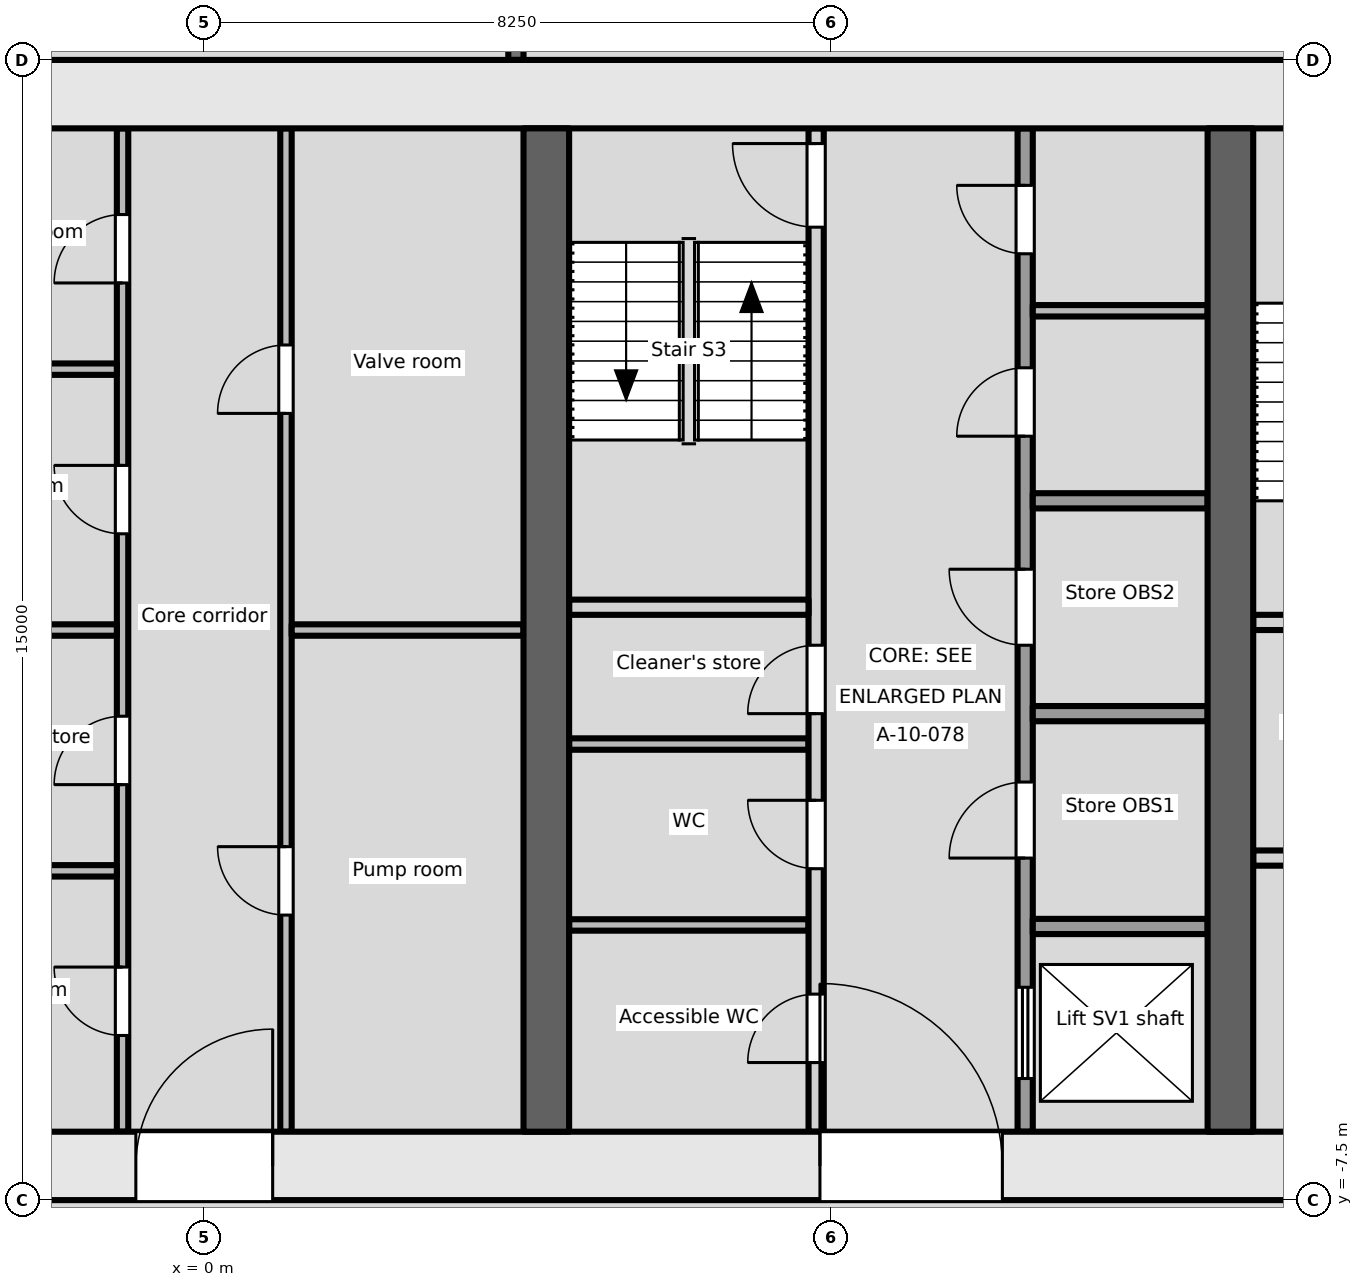
"""IFC4 building model, lengths in metres.
Left out: names, types, materials, properties, quantities, classifications, styles, units other than length and angle.
Written with IfcOpenShell. Run it as: python <this file> out.ifc"""

import sys

from ifc_helpers import new_model, si_unit, direction, frame, frame_2d, origin, place, context, subcontext, project, spatial, rectangle, extrude, element, fill, save


model = new_model("IFC4")
c1 = context("Model", 3, precision=1e-05, world=origin(), true_north=direction((0.0, 1.0)))
c2 = subcontext(c1, "Body", "Model", "MODEL_VIEW")
j1 = project(units=[si_unit("LENGTHUNIT", "METRE"), si_unit("PLANEANGLEUNIT", "RADIAN")], contexts=[c1])
p1 = place(None, origin())
s1 = spatial("IfcSite", under=j1, at=p1, CompositionType="ELEMENT")
p2 = place(p1, origin())
s2 = spatial("IfcBuilding", under=s1, at=p2, CompositionType="ELEMENT")
p3 = place(p2, frame((0.0, 0.0, -13.5)))
s3 = spatial("IfcBuildingStorey", under=s2, at=p3, CompositionType="ELEMENT", Elevation=-13.5)
p4 = place(p3, frame((-18.0, -7.05, -0.2), z_axis=(0.0, 0.0, 1.0), x_axis=(1.0, 0.0, 0.0)))
e1 = element("IfcWall", 1, at=p4, inside=s3, PredefinedType="SHEAR", context=c2, shape_type="SweptSolid", body=[
    extrude(rectangle(XDim=36.0, YDim=0.9, at=frame_2d((18.0, 0.0))), origin(), (0.0, 0.0, 1.0), 4.0),
])
p5 = place(p4, frame((8.1, 0.0, 0.2)))
e2 = element("IfcOpeningElement", 2, at=p5, cuts=e1, PredefinedType="OPENING", context=c2, shape_type="SweptSolid", body=[
    extrude(rectangle(XDim=1.8, YDim=2.1, at=frame_2d((0.9, 1.05))), frame((0.0, 0.46, 0.0), z_axis=(0.0, -1.0, 0.0), x_axis=(1.0, 0.0, 0.0)), (0.0, 0.0, 1.0), 0.921),
])
p6 = place(p4, frame((17.1, 0.0, 0.2)))
e3 = element("IfcOpeningElement", 3, at=p6, cuts=e1, PredefinedType="OPENING", context=c2, shape_type="SweptSolid", body=[
    extrude(rectangle(XDim=1.8, YDim=2.1, at=frame_2d((0.9, 1.05))), frame((0.0, 0.46, 0.0), z_axis=(0.0, -1.0, 0.0), x_axis=(1.0, 0.0, 0.0)), (0.0, 0.0, 1.0), 0.921),
])
p7 = place(p4, frame((26.1, 0.0, 0.2)))
e4 = element("IfcOpeningElement", 4, at=p7, cuts=e1, PredefinedType="OPENING", context=c2, shape_type="SweptSolid", body=[
    extrude(rectangle(XDim=2.4, YDim=2.1, at=frame_2d((1.2, 1.05))), frame((0.0, 0.46, 0.0), z_axis=(0.0, -1.0, 0.0), x_axis=(1.0, 0.0, 0.0)), (0.0, 0.0, 1.0), 0.921),
])
p8 = place(p3, frame((-18.0, 7.05, -0.2), z_axis=(0.0, 0.0, 1.0), x_axis=(1.0, 0.0, 0.0)))
e5 = element("IfcWall", 5, at=p8, inside=s3, PredefinedType="SHEAR", context=c2, shape_type="SweptSolid", body=[
    extrude(rectangle(XDim=36.0, YDim=0.9, at=frame_2d((18.0, 0.0))), origin(), (0.0, 0.0, 1.0), 4.0),
])
for number, where, z_axis, x_axis in (
    (6, (4.5, -6.6, -0.2), (0.0, 0.0, 1.0), (0.0, 1.0, 0.0)),
    (7, (13.5, -6.6, -0.2), (0.0, 0.0, 1.0), (0.0, 1.0, 0.0)),
):
    element("IfcWall", number, at=place(p3, frame(where, z_axis=z_axis, x_axis=x_axis)), inside=s3, PredefinedType="SHEAR", context=c2, shape_type="SweptSolid", body=[
        extrude(rectangle(XDim=13.2, YDim=0.6, at=frame_2d((6.6, 0.0))), origin(), (0.0, 0.0, 1.0), 4.0),
    ])
p9 = place(p3, frame((13.8, -3.0, 0.0), z_axis=(0.0, 0.0, 1.0), x_axis=(1.0, 0.0, 0.0)))
e8 = element("IfcWall", 8, at=p9, inside=s3, PredefinedType="PARTITIONING", context=c2, shape_type="SweptSolid", body=[
    extrude(rectangle(XDim=3.3, YDim=0.2, at=frame_2d((1.65, 0.0))), origin(), (0.0, 0.0, 1.0), 3.8),
])
p10 = place(p9, frame((1.1, 0.0, 0.0)))
e9 = element("IfcOpeningElement", 9, at=p10, cuts=e8, PredefinedType="OPENING", context=c2, shape_type="SweptSolid", body=[
    extrude(rectangle(XDim=1.1, YDim=2.1, at=frame_2d((0.55, 1.05))), frame((0.0, 0.111, 0.0), z_axis=(0.0, -1.0, 0.0), x_axis=(1.0, 0.0, 0.0)), (0.0, 0.0, 1.0), 0.221),
])
p11 = place(p3, frame((13.8, 0.1, 0.0), z_axis=(0.0, 0.0, 1.0), x_axis=(1.0, 0.0, 0.0)))
e10 = element("IfcWall", 10, at=p11, inside=s3, PredefinedType="PARTITIONING", context=c2, shape_type="SweptSolid", body=[
    extrude(rectangle(XDim=3.3, YDim=0.2, at=frame_2d((1.65, 0.0))), origin(), (0.0, 0.0, 1.0), 3.8),
])
p12 = place(p11, frame((1.1, 0.0, 0.0)))
e11 = element("IfcOpeningElement", 11, at=p12, cuts=e10, PredefinedType="OPENING", context=c2, shape_type="SweptSolid", body=[
    extrude(rectangle(XDim=1.1, YDim=2.1, at=frame_2d((0.55, 1.05))), frame((0.0, 0.111, 0.0), z_axis=(0.0, -1.0, 0.0), x_axis=(1.0, 0.0, 0.0)), (0.0, 0.0, 1.0), 0.221),
])
p13 = place(p3, frame((-1.075, -6.6, 0.0), z_axis=(0.0, 0.0, 1.0), x_axis=(0.0, 1.0, 0.0)))
e12 = element("IfcWall", 12, at=p13, inside=s3, PredefinedType="PARTITIONING", context=c2, shape_type="SweptSolid", body=[
    extrude(rectangle(XDim=13.2, YDim=0.15, at=frame_2d((6.6, 0.0))), origin(), (0.0, 0.0, 1.0), 3.8),
])
p14 = place(p13, frame((1.266, 0.0, 0.0)))
e13 = element("IfcOpeningElement", 13, at=p14, cuts=e12, PredefinedType="OPENING", context=c2, shape_type="SweptSolid", body=[
    extrude(rectangle(XDim=0.9, YDim=2.1, at=frame_2d((0.45, 1.05))), frame((0.0, 0.085, 0.0), z_axis=(0.0, -1.0, 0.0), x_axis=(1.0, 0.0, 0.0)), (0.0, 0.0, 1.0), 0.171),
])
p15 = place(p13, frame((4.566, 0.0, 0.0)))
e14 = element("IfcOpeningElement", 14, at=p15, cuts=e12, PredefinedType="OPENING", context=c2, shape_type="SweptSolid", body=[
    extrude(rectangle(XDim=0.9, YDim=2.1, at=frame_2d((0.45, 1.05))), frame((0.0, 0.085, 0.0), z_axis=(0.0, -1.0, 0.0), x_axis=(1.0, 0.0, 0.0)), (0.0, 0.0, 1.0), 0.171),
])
p16 = place(p13, frame((7.866, 0.0, 0.0)))
e15 = element("IfcOpeningElement", 15, at=p16, cuts=e12, PredefinedType="OPENING", context=c2, shape_type="SweptSolid", body=[
    extrude(rectangle(XDim=0.9, YDim=2.1, at=frame_2d((0.45, 1.05))), frame((0.0, 0.085, 0.0), z_axis=(0.0, -1.0, 0.0), x_axis=(1.0, 0.0, 0.0)), (0.0, 0.0, 1.0), 0.171),
])
p17 = place(p13, frame((11.166, 0.0, 0.0)))
e16 = element("IfcOpeningElement", 16, at=p17, cuts=e12, PredefinedType="OPENING", context=c2, shape_type="SweptSolid", body=[
    extrude(rectangle(XDim=0.9, YDim=2.1, at=frame_2d((0.45, 1.05))), frame((0.0, 0.085, 0.0), z_axis=(0.0, -1.0, 0.0), x_axis=(1.0, 0.0, 0.0)), (0.0, 0.0, 1.0), 0.171),
])
for number, where, z_axis, x_axis in (
    (17, (-4.2, -3.168, 0.0), (0.0, 0.0, 1.0), (1.0, 0.0, 0.0)),
    (18, (-4.2, 0.0, 0.0), (0.0, 0.0, 1.0), (1.0, 0.0, 0.0)),
    (19, (-4.2, 3.432, 0.0), (0.0, 0.0, 1.0), (1.0, 0.0, 0.0)),
):
    element("IfcWall", number, at=place(p3, frame(where, z_axis=z_axis, x_axis=x_axis)), inside=s3, PredefinedType="PARTITIONING", context=c2, shape_type="SweptSolid", body=[
        extrude(rectangle(XDim=3.05, YDim=0.15, at=frame_2d((1.525, 0.0))), origin(), (0.0, 0.0, 1.0), 3.8),
    ])
p18 = place(p3, frame((1.075, -6.6, 0.0), z_axis=(0.0, 0.0, 1.0), x_axis=(0.0, 1.0, 0.0)))
e20 = element("IfcWall", 20, at=p18, inside=s3, PredefinedType="PARTITIONING", context=c2, shape_type="SweptSolid", body=[
    extrude(rectangle(XDim=13.2, YDim=0.15, at=frame_2d((6.6, 0.0))), origin(), (0.0, 0.0, 1.0), 3.8),
])
p19 = place(p18, frame((2.85, 0.0, 0.0)))
e21 = element("IfcOpeningElement", 21, at=p19, cuts=e20, PredefinedType="OPENING", context=c2, shape_type="SweptSolid", body=[
    extrude(rectangle(XDim=0.9, YDim=2.1, at=frame_2d((0.45, 1.05))), frame((0.0, 0.085, 0.0), z_axis=(0.0, -1.0, 0.0), x_axis=(1.0, 0.0, 0.0)), (0.0, 0.0, 1.0), 0.171),
])
p20 = place(p18, frame((9.45, 0.0, 0.0)))
e22 = element("IfcOpeningElement", 22, at=p20, cuts=e20, PredefinedType="OPENING", context=c2, shape_type="SweptSolid", body=[
    extrude(rectangle(XDim=0.9, YDim=2.1, at=frame_2d((0.45, 1.05))), frame((0.0, 0.085, 0.0), z_axis=(0.0, -1.0, 0.0), x_axis=(1.0, 0.0, 0.0)), (0.0, 0.0, 1.0), 0.171),
])
p21 = place(p3, frame((1.15, 0.0, 0.0), z_axis=(0.0, 0.0, 1.0), x_axis=(1.0, 0.0, 0.0)))
e23 = element("IfcWall", 23, at=p21, inside=s3, PredefinedType="PARTITIONING", context=c2, shape_type="SweptSolid", body=[
    extrude(rectangle(XDim=3.05, YDim=0.15, at=frame_2d((1.525, 0.0))), origin(), (0.0, 0.0, 1.0), 3.8),
])
p22 = place(p3, frame((8.05, -6.6, 0.0), z_axis=(0.0, 0.0, 1.0), x_axis=(0.0, 1.0, 0.0)))
e24 = element("IfcWall", 24, at=p22, inside=s3, PredefinedType="PARTITIONING", context=c2, shape_type="SweptSolid", body=[
    extrude(rectangle(XDim=13.2, YDim=0.2, at=frame_2d((6.6, 0.0))), origin(), (0.0, 0.0, 1.0), 3.8),
])
p23 = place(p22, frame((0.91, 0.0, 0.0)))
e25 = element("IfcOpeningElement", 25, at=p23, cuts=e24, PredefinedType="OPENING", context=c2, shape_type="SweptSolid", body=[
    extrude(rectangle(XDim=0.9, YDim=2.1, at=frame_2d((0.45, 1.05))), frame((0.0, 0.111, 0.0), z_axis=(0.0, -1.0, 0.0), x_axis=(1.0, 0.0, 0.0)), (0.0, 0.0, 1.0), 0.221),
])
p24 = place(p22, frame((3.46, 0.0, 0.0)))
e26 = element("IfcOpeningElement", 26, at=p24, cuts=e24, PredefinedType="OPENING", context=c2, shape_type="SweptSolid", body=[
    extrude(rectangle(XDim=0.9, YDim=2.1, at=frame_2d((0.45, 1.05))), frame((0.0, 0.111, 0.0), z_axis=(0.0, -1.0, 0.0), x_axis=(1.0, 0.0, 0.0)), (0.0, 0.0, 1.0), 0.221),
])
p25 = place(p22, frame((5.5, 0.0, 0.0)))
e27 = element("IfcOpeningElement", 27, at=p25, cuts=e24, PredefinedType="OPENING", context=c2, shape_type="SweptSolid", body=[
    extrude(rectangle(XDim=0.9, YDim=2.1, at=frame_2d((0.45, 1.05))), frame((0.0, 0.111, 0.0), z_axis=(0.0, -1.0, 0.0), x_axis=(1.0, 0.0, 0.0)), (0.0, 0.0, 1.0), 0.221),
])
p26 = place(p22, frame((11.9, 0.0, 0.0)))
e28 = element("IfcOpeningElement", 28, at=p26, cuts=e24, PredefinedType="OPENING", context=c2, shape_type="SweptSolid", body=[
    extrude(rectangle(XDim=1.1, YDim=2.1, at=frame_2d((0.55, 1.05))), frame((0.0, 0.111, 0.0), z_axis=(0.0, -1.0, 0.0), x_axis=(1.0, 0.0, 0.0)), (0.0, 0.0, 1.0), 0.221),
])
p27 = place(p3, frame((10.8, -6.6, 0.0), z_axis=(0.0, 0.0, 1.0), x_axis=(0.0, 1.0, 0.0)))
e29 = element("IfcWall", 29, at=p27, inside=s3, PredefinedType="PARTITIONING", context=c2, shape_type="SweptSolid", body=[
    extrude(rectangle(XDim=13.2, YDim=0.2, at=frame_2d((6.6, 0.0))), origin(), (0.0, 0.0, 1.0), 3.8),
])
p28 = place(p27, frame((0.7, 0.0, 0.0)))
e30 = element("IfcOpeningElement", 30, at=p28, cuts=e29, PredefinedType="OPENING", context=c2, shape_type="SweptSolid", body=[
    extrude(rectangle(XDim=1.2, YDim=2.1, at=frame_2d((0.6, 1.05))), frame((0.0, 0.111, 0.0), z_axis=(0.0, -1.0, 0.0), x_axis=(1.0, 0.0, 0.0)), (0.0, 0.0, 1.0), 0.221),
])
p29 = place(p27, frame((3.6, 0.0, 0.0)))
e31 = element("IfcOpeningElement", 31, at=p29, cuts=e29, PredefinedType="OPENING", context=c2, shape_type="SweptSolid", body=[
    extrude(rectangle(XDim=1.0, YDim=2.1, at=frame_2d((0.5, 1.05))), frame((0.0, 0.111, 0.0), z_axis=(0.0, -1.0, 0.0), x_axis=(1.0, 0.0, 0.0)), (0.0, 0.0, 1.0), 0.221),
])
p30 = place(p27, frame((6.4, 0.0, 0.0)))
e32 = element("IfcOpeningElement", 32, at=p30, cuts=e29, PredefinedType="OPENING", context=c2, shape_type="SweptSolid", body=[
    extrude(rectangle(XDim=1.0, YDim=2.1, at=frame_2d((0.5, 1.05))), frame((0.0, 0.111, 0.0), z_axis=(0.0, -1.0, 0.0), x_axis=(1.0, 0.0, 0.0)), (0.0, 0.0, 1.0), 0.221),
])
p31 = place(p27, frame((9.15, 0.0, 0.0)))
e33 = element("IfcOpeningElement", 33, at=p31, cuts=e29, PredefinedType="OPENING", context=c2, shape_type="SweptSolid", body=[
    extrude(rectangle(XDim=0.9, YDim=2.1, at=frame_2d((0.45, 1.05))), frame((0.0, 0.111, 0.0), z_axis=(0.0, -1.0, 0.0), x_axis=(1.0, 0.0, 0.0)), (0.0, 0.0, 1.0), 0.221),
])
p32 = place(p27, frame((11.55, 0.0, 0.0)))
e34 = element("IfcOpeningElement", 34, at=p32, cuts=e29, PredefinedType="OPENING", context=c2, shape_type="SweptSolid", body=[
    extrude(rectangle(XDim=0.9, YDim=2.1, at=frame_2d((0.45, 1.05))), frame((0.0, 0.111, 0.0), z_axis=(0.0, -1.0, 0.0), x_axis=(1.0, 0.0, 0.0)), (0.0, 0.0, 1.0), 0.221),
])
p33 = place(p3, frame((4.8, 0.3, 0.0), z_axis=(0.0, 0.0, 1.0), x_axis=(1.0, 0.0, 0.0)))
e35 = element("IfcWall", 35, at=p33, inside=s3, PredefinedType="PARTITIONING", context=c2, shape_type="SweptSolid", body=[
    extrude(rectangle(XDim=3.15, YDim=0.2, at=frame_2d((1.575, 0.0))), origin(), (0.0, 0.0, 1.0), 3.8),
])
for number, where, z_axis, x_axis in (
    (36, (4.8, -3.88, 0.0), (0.0, 0.0, 1.0), (1.0, 0.0, 0.0)),
    (37, (4.8, -1.5, 0.0), (0.0, 0.0, 1.0), (1.0, 0.0, 0.0)),
):
    element("IfcWall", number, at=place(p3, frame(where, z_axis=z_axis, x_axis=x_axis)), inside=s3, PredefinedType="PARTITIONING", context=c2, shape_type="SweptSolid", body=[
        extrude(rectangle(XDim=3.15, YDim=0.15, at=frame_2d((1.575, 0.0))), origin(), (0.0, 0.0, 1.0), 3.8),
    ])
for number, where, z_axis, x_axis in (
    (38, (10.9, -3.9, 0.0), (0.0, 0.0, 1.0), (1.0, 0.0, 0.0)),
    (39, (10.9, -1.1, 0.0), (0.0, 0.0, 1.0), (1.0, 0.0, 0.0)),
    (40, (10.9, 1.7, 0.0), (0.0, 0.0, 1.0), (1.0, 0.0, 0.0)),
):
    element("IfcWall", number, at=place(p3, frame(where, z_axis=z_axis, x_axis=x_axis)), inside=s3, PredefinedType="PARTITIONING", context=c2, shape_type="SweptSolid", body=[
        extrude(rectangle(XDim=2.3, YDim=0.2, at=frame_2d((1.15, 0.0))), origin(), (0.0, 0.0, 1.0), 3.8),
    ])
p34 = place(p3, frame((10.9, 4.2, 0.0), z_axis=(0.0, 0.0, 1.0), x_axis=(1.0, 0.0, 0.0)))
e41 = element("IfcWall", 41, at=p34, inside=s3, PredefinedType="PARTITIONING", context=c2, shape_type="SweptSolid", body=[
    extrude(rectangle(XDim=2.3, YDim=0.15, at=frame_2d((1.15, 0.0))), origin(), (0.0, 0.0, 1.0), 3.8),
])
p35 = place(p3, frame((4.1, 13.74, 0.0), z_axis=(0.0, 0.0, 1.0), x_axis=(0.0, -1.0, 0.0)))
e42 = element("IfcWall", 42, at=p35, inside=s3, PredefinedType="PARTITIONING", context=c2, shape_type="SweptSolid", body=[
    extrude(rectangle(XDim=6.24, YDim=0.2, at=frame_2d((3.12, 0.0))), origin(), (0.0, 0.0, 1.0), 2.8),
])
p36 = place(p14, origin())
e43 = element("IfcDoor", 43, at=p36, inside=s3, OperationType="SINGLE_SWING_RIGHT", PredefinedType="DOOR", context=c2, shape_type="SweptSolid", body=[
    extrude(rectangle(XDim=0.9, YDim=2.1, at=frame_2d((0.45, 1.05))), frame((0.0, 0.025, 0.0), z_axis=(0.0, -1.0, 0.0), x_axis=(1.0, 0.0, 0.0)), (0.0, 0.0, 1.0), 0.05),
])
fill(e13, e43)
p37 = place(p15, origin())
e44 = element("IfcDoor", 44, at=p37, inside=s3, OperationType="SINGLE_SWING_LEFT", PredefinedType="DOOR", context=c2, shape_type="SweptSolid", body=[
    extrude(rectangle(XDim=0.9, YDim=2.1, at=frame_2d((0.45, 1.05))), frame((0.0, 0.025, 0.0), z_axis=(0.0, -1.0, 0.0), x_axis=(1.0, 0.0, 0.0)), (0.0, 0.0, 1.0), 0.05),
])
fill(e14, e44)
p38 = place(p16, origin())
e45 = element("IfcDoor", 45, at=p38, inside=s3, OperationType="SINGLE_SWING_RIGHT", PredefinedType="DOOR", context=c2, shape_type="SweptSolid", body=[
    extrude(rectangle(XDim=0.9, YDim=2.1, at=frame_2d((0.45, 1.05))), frame((0.0, 0.025, 0.0), z_axis=(0.0, -1.0, 0.0), x_axis=(1.0, 0.0, 0.0)), (0.0, 0.0, 1.0), 0.05),
])
fill(e15, e45)
p39 = place(p17, origin())
e46 = element("IfcDoor", 46, at=p39, inside=s3, OperationType="SINGLE_SWING_LEFT", PredefinedType="DOOR", context=c2, shape_type="SweptSolid", body=[
    extrude(rectangle(XDim=0.9, YDim=2.1, at=frame_2d((0.45, 1.05))), frame((0.0, 0.025, 0.0), z_axis=(0.0, -1.0, 0.0), x_axis=(1.0, 0.0, 0.0)), (0.0, 0.0, 1.0), 0.05),
])
fill(e16, e46)
p40 = place(p19, origin())
e47 = element("IfcDoor", 47, at=p40, inside=s3, OperationType="SINGLE_SWING_RIGHT", PredefinedType="DOOR", context=c2, shape_type="SweptSolid", body=[
    extrude(rectangle(XDim=0.9, YDim=2.1, at=frame_2d((0.45, 1.05))), frame((0.0, 0.025, 0.0), z_axis=(0.0, -1.0, 0.0), x_axis=(1.0, 0.0, 0.0)), (0.0, 0.0, 1.0), 0.05),
])
fill(e21, e47)
p41 = place(p20, origin())
e48 = element("IfcDoor", 48, at=p41, inside=s3, OperationType="SINGLE_SWING_LEFT", PredefinedType="DOOR", context=c2, shape_type="SweptSolid", body=[
    extrude(rectangle(XDim=0.9, YDim=2.1, at=frame_2d((0.45, 1.05))), frame((0.0, 0.025, 0.0), z_axis=(0.0, -1.0, 0.0), x_axis=(1.0, 0.0, 0.0)), (0.0, 0.0, 1.0), 0.05),
])
fill(e22, e48)
p42 = place(p6, origin())
e49 = element("IfcDoor", 49, at=p42, inside=s3, OperationType="SINGLE_SWING_RIGHT", PredefinedType="DOOR", context=c2, shape_type="SweptSolid", body=[
    extrude(rectangle(XDim=1.8, YDim=2.1, at=frame_2d((0.9, 1.05))), frame((0.0, 0.025, 0.0), z_axis=(0.0, -1.0, 0.0), x_axis=(1.0, 0.0, 0.0)), (0.0, 0.0, 1.0), 0.05),
])
fill(e3, e49)
p43 = place(p23, origin())
e50 = element("IfcDoor", 50, at=p43, inside=s3, OperationType="SINGLE_SWING_LEFT", PredefinedType="DOOR", context=c2, shape_type="SweptSolid", body=[
    extrude(rectangle(XDim=0.9, YDim=2.1, at=frame_2d((0.45, 1.05))), frame((0.0, 0.025, 0.0), z_axis=(0.0, -1.0, 0.0), x_axis=(1.0, 0.0, 0.0)), (0.0, 0.0, 1.0), 0.05),
])
fill(e25, e50)
p44 = place(p24, origin())
e51 = element("IfcDoor", 51, at=p44, inside=s3, OperationType="SINGLE_SWING_RIGHT", PredefinedType="DOOR", context=c2, shape_type="SweptSolid", body=[
    extrude(rectangle(XDim=0.9, YDim=2.1, at=frame_2d((0.45, 1.05))), frame((0.0, 0.025, 0.0), z_axis=(0.0, -1.0, 0.0), x_axis=(1.0, 0.0, 0.0)), (0.0, 0.0, 1.0), 0.05),
])
fill(e26, e51)
p45 = place(p25, origin())
e52 = element("IfcDoor", 52, at=p45, inside=s3, OperationType="SINGLE_SWING_LEFT", PredefinedType="DOOR", context=c2, shape_type="SweptSolid", body=[
    extrude(rectangle(XDim=0.9, YDim=2.1, at=frame_2d((0.45, 1.05))), frame((0.0, 0.025, 0.0), z_axis=(0.0, -1.0, 0.0), x_axis=(1.0, 0.0, 0.0)), (0.0, 0.0, 1.0), 0.05),
])
fill(e27, e52)
p46 = place(p26, origin())
e53 = element("IfcDoor", 53, at=p46, inside=s3, OperationType="SINGLE_SWING_RIGHT", PredefinedType="DOOR", context=c2, shape_type="SweptSolid", body=[
    extrude(rectangle(XDim=1.1, YDim=2.1, at=frame_2d((0.55, 1.05))), frame((0.0, 0.025, 0.0), z_axis=(0.0, -1.0, 0.0), x_axis=(1.0, 0.0, 0.0)), (0.0, 0.0, 1.0), 0.05),
])
fill(e28, e53)
p47 = place(p7, origin())
e54 = element("IfcDoor", 54, at=p47, inside=s3, OperationType="DOUBLE_DOOR_DOUBLE_SWING", PredefinedType="DOOR", context=c2, shape_type="SweptSolid", body=[
    extrude(rectangle(XDim=2.4, YDim=2.1, at=frame_2d((1.2, 1.05))), frame((0.0, 0.025, 0.0), z_axis=(0.0, -1.0, 0.0), x_axis=(1.0, 0.0, 0.0)), (0.0, 0.0, 1.0), 0.05),
])
fill(e4, e54)
p48 = place(p28, origin())
e55 = element("IfcDoor", 55, at=p48, inside=s3, OperationType="DOUBLE_DOOR_SLIDING", PredefinedType="DOOR", context=c2, shape_type="SweptSolid", body=[
    extrude(rectangle(XDim=1.2, YDim=2.1, at=frame_2d((0.6, 1.05))), frame((0.0, 0.025, 0.0), z_axis=(0.0, -1.0, 0.0), x_axis=(1.0, 0.0, 0.0)), (0.0, 0.0, 1.0), 0.05),
])
fill(e30, e55)
p49 = place(p29, origin())
e56 = element("IfcDoor", 56, at=p49, inside=s3, OperationType="SINGLE_SWING_LEFT", PredefinedType="DOOR", context=c2, shape_type="SweptSolid", body=[
    extrude(rectangle(XDim=1.0, YDim=2.1, at=frame_2d((0.5, 1.05))), frame((0.0, 0.025, 0.0), z_axis=(0.0, -1.0, 0.0), x_axis=(1.0, 0.0, 0.0)), (0.0, 0.0, 1.0), 0.05),
])
fill(e31, e56)
p50 = place(p30, origin())
e57 = element("IfcDoor", 57, at=p50, inside=s3, OperationType="SINGLE_SWING_RIGHT", PredefinedType="DOOR", context=c2, shape_type="SweptSolid", body=[
    extrude(rectangle(XDim=1.0, YDim=2.1, at=frame_2d((0.5, 1.05))), frame((0.0, 0.025, 0.0), z_axis=(0.0, -1.0, 0.0), x_axis=(1.0, 0.0, 0.0)), (0.0, 0.0, 1.0), 0.05),
])
fill(e32, e57)
p51 = place(p31, origin())
e58 = element("IfcDoor", 58, at=p51, inside=s3, OperationType="SINGLE_SWING_LEFT", PredefinedType="DOOR", context=c2, shape_type="SweptSolid", body=[
    extrude(rectangle(XDim=0.9, YDim=2.1, at=frame_2d((0.45, 1.05))), frame((0.0, 0.025, 0.0), z_axis=(0.0, -1.0, 0.0), x_axis=(1.0, 0.0, 0.0)), (0.0, 0.0, 1.0), 0.05),
])
fill(e33, e58)
p52 = place(p32, origin())
e59 = element("IfcDoor", 59, at=p52, inside=s3, OperationType="SINGLE_SWING_RIGHT", PredefinedType="DOOR", context=c2, shape_type="SweptSolid", body=[
    extrude(rectangle(XDim=0.9, YDim=2.1, at=frame_2d((0.45, 1.05))), frame((0.0, 0.025, 0.0), z_axis=(0.0, -1.0, 0.0), x_axis=(1.0, 0.0, 0.0)), (0.0, 0.0, 1.0), 0.05),
])
fill(e34, e59)
save(model, sys.argv[1])
